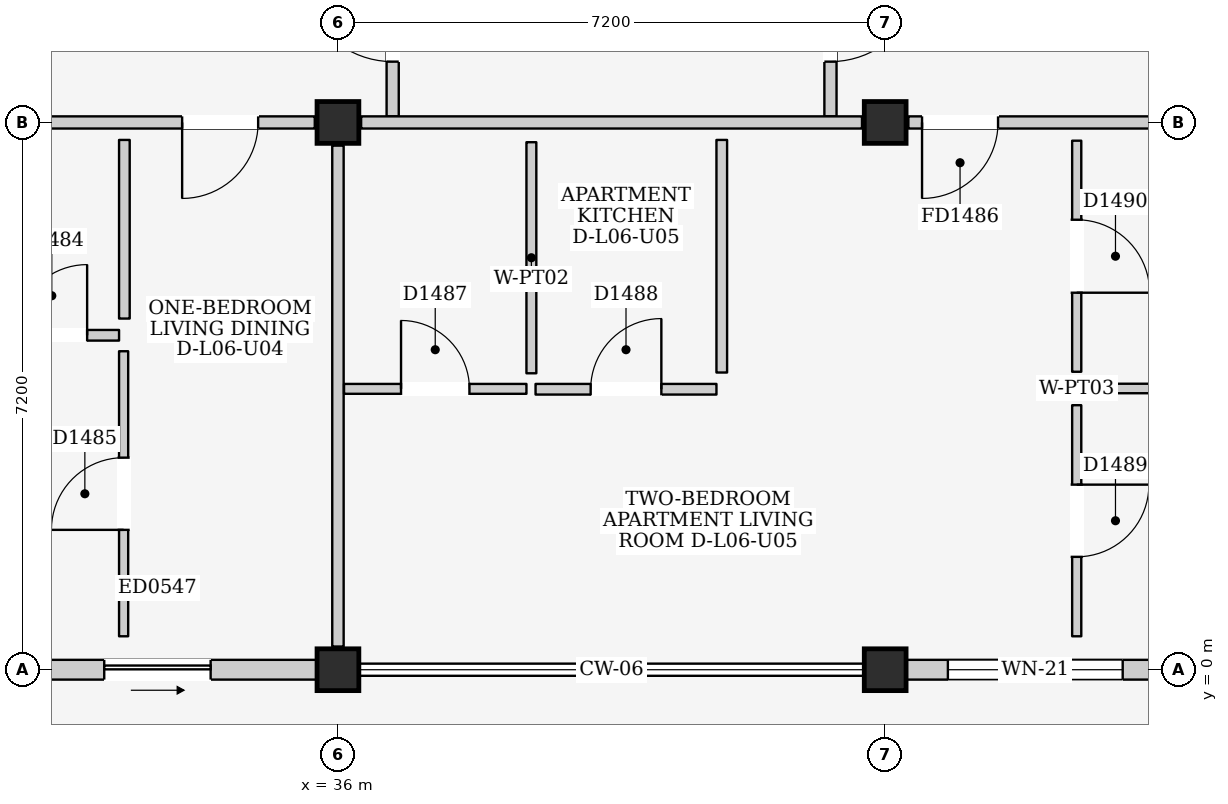
"""IFC4 building model, lengths in metres.
Left out: names, types, materials, properties, quantities, classifications, styles, units other than length and angle.
Written with IfcOpenShell. Run it as: python <this file> out.ifc"""

import sys

from ifc_helpers import new_model, si_unit, direction, frame, frame_2d, origin, origin_2d, place, context, subcontext, project, spatial, rectangle, extrude, element, fill, save


model = new_model("IFC4")
c1 = context("Model", 3, precision=1e-05, world=origin(), true_north=direction((0.0, 1.0)))
c2 = subcontext(c1, "Body", "Model", "MODEL_VIEW")
j1 = project(units=[si_unit("LENGTHUNIT", "METRE"), si_unit("PLANEANGLEUNIT", "RADIAN")], contexts=[c1])
p1 = place(None, origin())
s1 = spatial("IfcSite", under=j1, at=p1, CompositionType="ELEMENT")
p2 = place(p1, origin())
s2 = spatial("IfcBuilding", under=s1, at=p2, CompositionType="ELEMENT")
p3 = place(p2, frame((0.0, 0.0, 21.9)))
s3 = spatial("IfcBuildingStorey", under=s2, at=p3, CompositionType="ELEMENT", Elevation=21.9)
for number, where, z_axis, x_axis in (
    (1, (36.0, 0.0, 0.0), (0.0, 0.0, 1.0), (1.0, 0.0, 0.0)),
    (2, (36.0, 7.2, 0.0), (0.0, 0.0, 1.0), (1.0, 0.0, 0.0)),
    (3, (43.2, 0.0, 0.0), (0.0, 0.0, 1.0), (1.0, 0.0, 0.0)),
    (4, (43.2, 7.2, 0.0), (0.0, 0.0, 1.0), (1.0, 0.0, 0.0)),
):
    element("IfcColumn", number, at=place(p3, frame(where, z_axis=z_axis, x_axis=x_axis)), inside=s3, PredefinedType="COLUMN", context=c2, shape_type="SweptSolid", body=[
        extrude(rectangle(XDim=0.55, YDim=0.55, at=origin_2d()), origin(), (0.0, 0.0, 1.0), 3.2),
    ])
p4 = place(p3, frame((29.075, 0.0, 0.0), z_axis=(0.0, 0.0, 1.0), x_axis=(1.0, 0.0, 0.0)))
e5 = element("IfcWall", 5, at=p4, inside=s3, PredefinedType="ELEMENTEDWALL", context=c2, shape_type="SweptSolid", body=[
    extrude(rectangle(XDim=6.65, YDim=0.26, at=frame_2d((3.325, 0.0))), origin(), (0.0, 0.0, 1.0), 2.515),
])
p5 = place(p4, frame((3.85, 0.0, 0.0)))
e6 = element("IfcOpeningElement", 6, at=p5, cuts=e5, PredefinedType="OPENING", context=c2, shape_type="SweptSolid", body=[
    extrude(rectangle(XDim=1.4, YDim=2.1, at=frame_2d((0.7, 1.05))), frame((0.0, 0.145, 0.0), z_axis=(0.0, -1.0, 0.0), x_axis=(1.0, 0.0, 0.0)), (0.0, 0.0, 1.0), 0.29),
])
p6 = place(p4, frame((0.55, 0.0, 0.9)))
e7 = element("IfcOpeningElement", 7, at=p6, cuts=e5, PredefinedType="OPENING", context=c2, shape_type="SweptSolid", body=[
    extrude(rectangle(XDim=1.65, YDim=1.35, at=frame_2d((0.825, 0.675))), frame((0.0, 0.145, 0.0), z_axis=(0.0, -1.0, 0.0), x_axis=(1.0, 0.0, 0.0)), (0.0, 0.0, 1.0), 0.29),
])
p7 = place(p3, frame((43.475, 0.0, 0.0), z_axis=(0.0, 0.0, 1.0), x_axis=(1.0, 0.0, 0.0)))
e8 = element("IfcWall", 8, at=p7, inside=s3, PredefinedType="ELEMENTEDWALL", context=c2, shape_type="SweptSolid", body=[
    extrude(rectangle(XDim=6.65, YDim=0.26, at=frame_2d((3.325, 0.0))), origin(), (0.0, 0.0, 1.0), 2.515),
])
p8 = place(p7, frame((3.85, 0.0, 0.0)))
e9 = element("IfcOpeningElement", 9, at=p8, cuts=e8, PredefinedType="OPENING", context=c2, shape_type="SweptSolid", body=[
    extrude(rectangle(XDim=1.6, YDim=2.12, at=frame_2d((0.8, 1.06))), frame((0.0, 0.145, 0.0), z_axis=(0.0, -1.0, 0.0), x_axis=(1.0, 0.0, 0.0)), (0.0, 0.0, 1.0), 0.29),
])
p9 = place(p7, frame((0.55, 0.0, 0.805)))
e10 = element("IfcOpeningElement", 10, at=p9, cuts=e8, PredefinedType="OPENING", context=c2, shape_type="SweptSolid", body=[
    extrude(rectangle(XDim=2.3, YDim=1.6, at=frame_2d((1.15, 0.8))), frame((0.0, 0.145, 0.0), z_axis=(0.0, -1.0, 0.0), x_axis=(1.0, 0.0, 0.0)), (0.0, 0.0, 1.0), 0.29),
])
p10 = place(p3, frame((36.72, 7.28, 0.0), z_axis=(0.0, 0.0, 1.0), x_axis=(0.0, 1.0, 0.0)))
e11 = element("IfcWall", 11, at=p10, inside=s3, PredefinedType="PARTITIONING", context=c2, shape_type="SweptSolid", body=[
    extrude(rectangle(XDim=4.32, YDim=0.16, at=frame_2d((2.16, 0.0))), origin(), (0.0, 0.0, 1.0), 2.98),
])
p11 = place(p10, frame((0.72, 0.0, 0.0)))
e12 = element("IfcOpeningElement", 12, at=p11, cuts=e11, PredefinedType="OPENING", context=c2, shape_type="SweptSolid", body=[
    extrude(rectangle(XDim=1.2, YDim=2.2, at=frame_2d((0.6, 1.1))), frame((0.0, 0.095, 0.0), z_axis=(0.0, -1.0, 0.0), x_axis=(1.0, 0.0, 0.0)), (0.0, 0.0, 1.0), 0.19),
])
p12 = place(p3, frame((42.48, 7.28, 0.0), z_axis=(0.0, 0.0, 1.0), x_axis=(0.0, 1.0, 0.0)))
e13 = element("IfcWall", 13, at=p12, inside=s3, PredefinedType="PARTITIONING", context=c2, shape_type="SweptSolid", body=[
    extrude(rectangle(XDim=4.32, YDim=0.16, at=frame_2d((2.16, 0.0))), origin(), (0.0, 0.0, 1.0), 2.98),
])
p13 = place(p12, frame((0.72, 0.0, 0.0)))
e14 = element("IfcOpeningElement", 14, at=p13, cuts=e13, PredefinedType="OPENING", context=c2, shape_type="SweptSolid", body=[
    extrude(rectangle(XDim=1.2, YDim=2.2, at=frame_2d((0.6, 1.1))), frame((0.0, 0.095, 0.0), z_axis=(0.0, -1.0, 0.0), x_axis=(1.0, 0.0, 0.0)), (0.0, 0.0, 1.0), 0.19),
])
p14 = place(p3, frame((29.105, 7.2, 0.0), z_axis=(0.0, 0.0, 1.0), x_axis=(1.0, 0.0, 0.0)))
e15 = element("IfcWall", 15, at=p14, inside=s3, PredefinedType="PARTITIONING", context=c2, shape_type="SweptSolid", body=[
    extrude(rectangle(XDim=6.59, YDim=0.16, at=frame_2d((3.295, 0.0))), origin(), (0.0, 0.0, 1.0), 2.365),
])
p15 = place(p14, frame((4.845, 0.0, 0.0)))
e16 = element("IfcOpeningElement", 16, at=p15, cuts=e15, PredefinedType="OPENING", context=c2, shape_type="SweptSolid", body=[
    extrude(rectangle(XDim=1.0, YDim=2.15, at=frame_2d((0.5, 1.075))), frame((0.0, 0.095, 0.0), z_axis=(0.0, -1.0, 0.0), x_axis=(1.0, 0.0, 0.0)), (0.0, 0.0, 1.0), 0.19),
])
p16 = place(p3, frame((36.0, 0.305, 0.0), z_axis=(0.0, 0.0, 1.0), x_axis=(0.0, 1.0, 0.0)))
e17 = element("IfcWall", 17, at=p16, inside=s3, PredefinedType="PARTITIONING", context=c2, shape_type="SweptSolid", body=[
    extrude(rectangle(XDim=6.59, YDim=0.15, at=frame_2d((3.295, 0.0))), origin(), (0.0, 0.0, 1.0), 2.465),
])
p17 = place(p3, frame((31.35, 4.4, 0.0), z_axis=(0.0, 0.0, 1.0), x_axis=(1.0, 0.0, 0.0)))
e18 = element("IfcWall", 18, at=p17, inside=s3, PredefinedType="PARTITIONING", context=c2, shape_type="SweptSolid", body=[
    extrude(rectangle(XDim=1.77, YDim=0.14, at=frame_2d((0.885, 0.0))), origin(), (0.0, 0.0, 1.0), 2.98),
])
p18 = place(p17, frame((0.42, 0.0, 0.0)))
e19 = element("IfcOpeningElement", 19, at=p18, cuts=e18, PredefinedType="OPENING", context=c2, shape_type="SweptSolid", body=[
    extrude(rectangle(XDim=0.93, YDim=2.14, at=frame_2d((0.465, 1.07))), frame((0.0, 0.085, 0.0), z_axis=(0.0, -1.0, 0.0), x_axis=(1.0, 0.0, 0.0)), (0.0, 0.0, 1.0), 0.17),
])
p19 = place(p3, frame((33.19, 4.62, 0.0), z_axis=(0.0, 0.0, 1.0), x_axis=(0.0, 1.0, 0.0)))
e20 = element("IfcWall", 20, at=p19, inside=s3, PredefinedType="PARTITIONING", context=c2, shape_type="SweptSolid", body=[
    extrude(rectangle(XDim=2.35, YDim=0.14, at=frame_2d((1.175, 0.0))), origin(), (0.0, 0.0, 1.0), 2.98),
])
p20 = place(p3, frame((33.18, 0.44, 0.0), z_axis=(0.0, 0.0, 1.0), x_axis=(0.0, 1.0, 0.0)))
e21 = element("IfcWall", 21, at=p20, inside=s3, PredefinedType="PARTITIONING", context=c2, shape_type="SweptSolid", body=[
    extrude(rectangle(XDim=3.75, YDim=0.12, at=frame_2d((1.875, 0.0))), origin(), (0.0, 0.0, 1.0), 2.98),
])
p21 = place(p20, frame((1.4, 0.0, 0.0)))
e22 = element("IfcOpeningElement", 22, at=p21, cuts=e21, PredefinedType="OPENING", context=c2, shape_type="SweptSolid", body=[
    extrude(rectangle(XDim=0.95, YDim=2.15, at=frame_2d((0.475, 1.075))), frame((0.0, 0.075, 0.0), z_axis=(0.0, -1.0, 0.0), x_axis=(1.0, 0.0, 0.0)), (0.0, 0.0, 1.0), 0.15),
])
p22 = place(p3, frame((36.305, 7.2, 0.0), z_axis=(0.0, 0.0, 1.0), x_axis=(1.0, 0.0, 0.0)))
e23 = element("IfcWall", 23, at=p22, inside=s3, PredefinedType="PARTITIONING", context=c2, shape_type="SweptSolid", body=[
    extrude(rectangle(XDim=6.59, YDim=0.16, at=frame_2d((3.295, 0.0))), origin(), (0.0, 0.0, 1.0), 2.365),
])
p23 = place(p3, frame((43.505, 7.2, 0.0), z_axis=(0.0, 0.0, 1.0), x_axis=(1.0, 0.0, 0.0)))
e24 = element("IfcWall", 24, at=p23, inside=s3, PredefinedType="PARTITIONING", context=c2, shape_type="SweptSolid", body=[
    extrude(rectangle(XDim=6.59, YDim=0.16, at=frame_2d((3.295, 0.0))), origin(), (0.0, 0.0, 1.0), 2.365),
])
p24 = place(p23, frame((0.18, 0.0, 0.0)))
e25 = element("IfcOpeningElement", 25, at=p24, cuts=e24, PredefinedType="OPENING", context=c2, shape_type="SweptSolid", body=[
    extrude(rectangle(XDim=1.0, YDim=2.15, at=frame_2d((0.5, 1.075))), frame((0.0, 0.095, 0.0), z_axis=(0.0, -1.0, 0.0), x_axis=(1.0, 0.0, 0.0)), (0.0, 0.0, 1.0), 0.19),
])
p25 = place(p3, frame((36.08, 3.695, 0.0), z_axis=(0.0, 0.0, 1.0), x_axis=(1.0, 0.0, 0.0)))
e26 = element("IfcWall", 26, at=p25, inside=s3, PredefinedType="PARTITIONING", context=c2, shape_type="SweptSolid", body=[
    extrude(rectangle(XDim=2.4, YDim=0.13, at=frame_2d((1.2, 0.0))), origin(), (0.0, 0.0, 1.0), 2.98),
])
p26 = place(p25, frame((0.75, 0.0, 0.0)))
e27 = element("IfcOpeningElement", 27, at=p26, cuts=e26, PredefinedType="OPENING", context=c2, shape_type="SweptSolid", body=[
    extrude(rectangle(XDim=0.9, YDim=2.1, at=frame_2d((0.45, 1.05))), frame((0.0, 0.08, 0.0), z_axis=(0.0, -1.0, 0.0), x_axis=(1.0, 0.0, 0.0)), (0.0, 0.0, 1.0), 0.16),
])
p27 = place(p3, frame((38.545, 3.9, 0.0), z_axis=(0.0, 0.0, 1.0), x_axis=(0.0, 1.0, 0.0)))
e28 = element("IfcWall", 28, at=p27, inside=s3, PredefinedType="PARTITIONING", context=c2, shape_type="SweptSolid", body=[
    extrude(rectangle(XDim=3.04, YDim=0.13, at=frame_2d((1.52, 0.0))), origin(), (0.0, 0.0, 1.0), 2.98),
])
p28 = place(p3, frame((38.6, 3.69, 0.0), z_axis=(0.0, 0.0, 1.0), x_axis=(1.0, 0.0, 0.0)))
e29 = element("IfcWall", 29, at=p28, inside=s3, PredefinedType="PARTITIONING", context=c2, shape_type="SweptSolid", body=[
    extrude(rectangle(XDim=2.38, YDim=0.14, at=frame_2d((1.19, 0.0))), origin(), (0.0, 0.0, 1.0), 2.98),
])
p29 = place(p28, frame((0.725, 0.0, 0.0)))
e30 = element("IfcOpeningElement", 30, at=p29, cuts=e29, PredefinedType="OPENING", context=c2, shape_type="SweptSolid", body=[
    extrude(rectangle(XDim=0.93, YDim=2.14, at=frame_2d((0.465, 1.07))), frame((0.0, 0.085, 0.0), z_axis=(0.0, -1.0, 0.0), x_axis=(1.0, 0.0, 0.0)), (0.0, 0.0, 1.0), 0.17),
])
p30 = place(p3, frame((41.05, 3.91, 0.0), z_axis=(0.0, 0.0, 1.0), x_axis=(0.0, 1.0, 0.0)))
e31 = element("IfcWall", 31, at=p30, inside=s3, PredefinedType="PARTITIONING", context=c2, shape_type="SweptSolid", body=[
    extrude(rectangle(XDim=3.06, YDim=0.14, at=frame_2d((1.53, 0.0))), origin(), (0.0, 0.0, 1.0), 2.98),
])
p31 = place(p3, frame((45.72, 0.44, 0.0), z_axis=(0.0, 0.0, 1.0), x_axis=(0.0, 1.0, 0.0)))
e32 = element("IfcWall", 32, at=p31, inside=s3, PredefinedType="PARTITIONING", context=c2, shape_type="SweptSolid", body=[
    extrude(rectangle(XDim=3.04, YDim=0.12, at=frame_2d((1.52, 0.0))), origin(), (0.0, 0.0, 1.0), 2.98),
])
p32 = place(p31, frame((1.045, 0.0, 0.0)))
e33 = element("IfcOpeningElement", 33, at=p32, cuts=e32, PredefinedType="OPENING", context=c2, shape_type="SweptSolid", body=[
    extrude(rectangle(XDim=0.95, YDim=2.15, at=frame_2d((0.475, 1.075))), frame((0.0, 0.075, 0.0), z_axis=(0.0, -1.0, 0.0), x_axis=(1.0, 0.0, 0.0)), (0.0, 0.0, 1.0), 0.15),
])
p33 = place(p3, frame((45.92, 3.7, 0.0), z_axis=(0.0, 0.0, 1.0), x_axis=(1.0, 0.0, 0.0)))
e34 = element("IfcWall", 34, at=p33, inside=s3, PredefinedType="PARTITIONING", context=c2, shape_type="SweptSolid", body=[
    extrude(rectangle(XDim=4.06, YDim=0.125, at=frame_2d((2.03, 0.0))), origin(), (0.0, 0.0, 1.0), 2.98),
])
p34 = place(p3, frame((45.72, 3.92, 0.0), z_axis=(0.0, 0.0, 1.0), x_axis=(0.0, 1.0, 0.0)))
e35 = element("IfcWall", 35, at=p34, inside=s3, PredefinedType="PARTITIONING", context=c2, shape_type="SweptSolid", body=[
    extrude(rectangle(XDim=3.04, YDim=0.12, at=frame_2d((1.52, 0.0))), origin(), (0.0, 0.0, 1.0), 2.98),
])
p35 = place(p34, frame((1.04, 0.0, 0.0)))
e36 = element("IfcOpeningElement", 36, at=p35, cuts=e35, PredefinedType="OPENING", context=c2, shape_type="SweptSolid", body=[
    extrude(rectangle(XDim=0.96, YDim=2.15, at=frame_2d((0.48, 1.075))), frame((0.0, 0.075, 0.0), z_axis=(0.0, -1.0, 0.0), x_axis=(1.0, 0.0, 0.0)), (0.0, 0.0, 1.0), 0.15),
])
p36 = place(p5, frame((1.4, 0.0, 0.0), z_axis=(0.0, 0.0, 1.0), x_axis=(-1.0, 0.0, 0.0)))
e37 = element("IfcDoor", 37, at=p36, inside=s3, OperationType="SLIDING_TO_RIGHT", PredefinedType="DOOR", context=c2, shape_type="SweptSolid", body=[
    extrude(rectangle(XDim=1.4, YDim=2.1, at=frame_2d((0.7, 1.05))), frame((0.0, 0.025, 0.0), z_axis=(0.0, -1.0, 0.0), x_axis=(1.0, 0.0, 0.0)), (0.0, 0.0, 1.0), 0.05),
])
fill(e6, e37)
p37 = place(p9, origin())
e38 = element("IfcWindow", 38, at=p37, inside=s3, PartitioningType="TRIPLE_PANEL_VERTICAL", PredefinedType="WINDOW", context=c2, shape_type="SweptSolid", body=[
    extrude(rectangle(XDim=2.3, YDim=1.6, at=frame_2d((1.15, 0.8))), frame((0.0, 0.03, 0.0), z_axis=(0.0, -1.0, 0.0), x_axis=(1.0, 0.0, 0.0)), (0.0, 0.0, 1.0), 0.06),
])
fill(e10, e38)
p38 = place(p11, origin())
e39 = element("IfcDoor", 39, at=p38, inside=s3, OperationType="SINGLE_SWING_RIGHT", PredefinedType="DOOR", context=c2, shape_type="SweptSolid", body=[
    extrude(rectangle(XDim=1.2, YDim=2.2, at=frame_2d((0.6, 1.1))), frame((0.0, 0.025, 0.0), z_axis=(0.0, -1.0, 0.0), x_axis=(1.0, 0.0, 0.0)), (0.0, 0.0, 1.0), 0.05),
])
fill(e12, e39)
p39 = place(p13, frame((1.2, 0.0, 0.0), z_axis=(0.0, 0.0, 1.0), x_axis=(-1.0, 0.0, 0.0)))
e40 = element("IfcDoor", 40, at=p39, inside=s3, OperationType="SINGLE_SWING_LEFT", PredefinedType="DOOR", context=c2, shape_type="SweptSolid", body=[
    extrude(rectangle(XDim=1.2, YDim=2.2, at=frame_2d((0.6, 1.1))), frame((0.0, 0.025, 0.0), z_axis=(0.0, -1.0, 0.0), x_axis=(1.0, 0.0, 0.0)), (0.0, 0.0, 1.0), 0.05),
])
fill(e14, e40)
p40 = place(p15, frame((1.0, 0.0, 0.0), z_axis=(0.0, 0.0, 1.0), x_axis=(-1.0, 0.0, 0.0)))
e41 = element("IfcDoor", 41, at=p40, inside=s3, OperationType="SINGLE_SWING_RIGHT", PredefinedType="DOOR", context=c2, shape_type="SweptSolid", body=[
    extrude(rectangle(XDim=1.0, YDim=2.15, at=frame_2d((0.5, 1.075))), frame((0.0, 0.025, 0.0), z_axis=(0.0, -1.0, 0.0), x_axis=(1.0, 0.0, 0.0)), (0.0, 0.0, 1.0), 0.05),
])
fill(e16, e41)
p41 = place(p18, origin())
e42 = element("IfcDoor", 42, at=p41, inside=s3, OperationType="SINGLE_SWING_RIGHT", PredefinedType="DOOR", context=c2, shape_type="SweptSolid", body=[
    extrude(rectangle(XDim=0.93, YDim=2.14, at=frame_2d((0.465, 1.07))), frame((0.0, 0.025, 0.0), z_axis=(0.0, -1.0, 0.0), x_axis=(1.0, 0.0, 0.0)), (0.0, 0.0, 1.0), 0.05),
])
fill(e19, e42)
p42 = place(p21, origin())
e43 = element("IfcDoor", 43, at=p42, inside=s3, OperationType="SINGLE_SWING_LEFT", PredefinedType="DOOR", context=c2, shape_type="SweptSolid", body=[
    extrude(rectangle(XDim=0.95, YDim=2.15, at=frame_2d((0.475, 1.075))), frame((0.0, 0.025, 0.0), z_axis=(0.0, -1.0, 0.0), x_axis=(1.0, 0.0, 0.0)), (0.0, 0.0, 1.0), 0.05),
])
fill(e22, e43)
p43 = place(p24, frame((1.0, 0.0, 0.0), z_axis=(0.0, 0.0, 1.0), x_axis=(-1.0, 0.0, 0.0)))
e44 = element("IfcDoor", 44, at=p43, inside=s3, OperationType="SINGLE_SWING_RIGHT", PredefinedType="DOOR", context=c2, shape_type="SweptSolid", body=[
    extrude(rectangle(XDim=1.0, YDim=2.15, at=frame_2d((0.5, 1.075))), frame((0.0, 0.025, 0.0), z_axis=(0.0, -1.0, 0.0), x_axis=(1.0, 0.0, 0.0)), (0.0, 0.0, 1.0), 0.05),
])
fill(e25, e44)
p44 = place(p26, origin())
e45 = element("IfcDoor", 45, at=p44, inside=s3, OperationType="SINGLE_SWING_LEFT", PredefinedType="DOOR", context=c2, shape_type="SweptSolid", body=[
    extrude(rectangle(XDim=0.9, YDim=2.1, at=frame_2d((0.45, 1.05))), frame((0.0, 0.025, 0.0), z_axis=(0.0, -1.0, 0.0), x_axis=(1.0, 0.0, 0.0)), (0.0, 0.0, 1.0), 0.05),
])
fill(e27, e45)
p45 = place(p29, origin())
e46 = element("IfcDoor", 46, at=p45, inside=s3, OperationType="SINGLE_SWING_RIGHT", PredefinedType="DOOR", context=c2, shape_type="SweptSolid", body=[
    extrude(rectangle(XDim=0.93, YDim=2.14, at=frame_2d((0.465, 1.07))), frame((0.0, 0.025, 0.0), z_axis=(0.0, -1.0, 0.0), x_axis=(1.0, 0.0, 0.0)), (0.0, 0.0, 1.0), 0.05),
])
fill(e30, e46)
p46 = place(p32, frame((0.95, 0.0, 0.0), z_axis=(0.0, 0.0, 1.0), x_axis=(-1.0, 0.0, 0.0)))
e47 = element("IfcDoor", 47, at=p46, inside=s3, OperationType="SINGLE_SWING_LEFT", PredefinedType="DOOR", context=c2, shape_type="SweptSolid", body=[
    extrude(rectangle(XDim=0.95, YDim=2.15, at=frame_2d((0.475, 1.075))), frame((0.0, 0.025, 0.0), z_axis=(0.0, -1.0, 0.0), x_axis=(1.0, 0.0, 0.0)), (0.0, 0.0, 1.0), 0.05),
])
fill(e33, e47)
p47 = place(p35, frame((0.96, 0.0, 0.0), z_axis=(0.0, 0.0, 1.0), x_axis=(-1.0, 0.0, 0.0)))
e48 = element("IfcDoor", 48, at=p47, inside=s3, OperationType="SINGLE_SWING_RIGHT", PredefinedType="DOOR", context=c2, shape_type="SweptSolid", body=[
    extrude(rectangle(XDim=0.96, YDim=2.15, at=frame_2d((0.48, 1.075))), frame((0.0, 0.025, 0.0), z_axis=(0.0, -1.0, 0.0), x_axis=(1.0, 0.0, 0.0)), (0.0, 0.0, 1.0), 0.05),
])
fill(e36, e48)
save(model, sys.argv[1])
